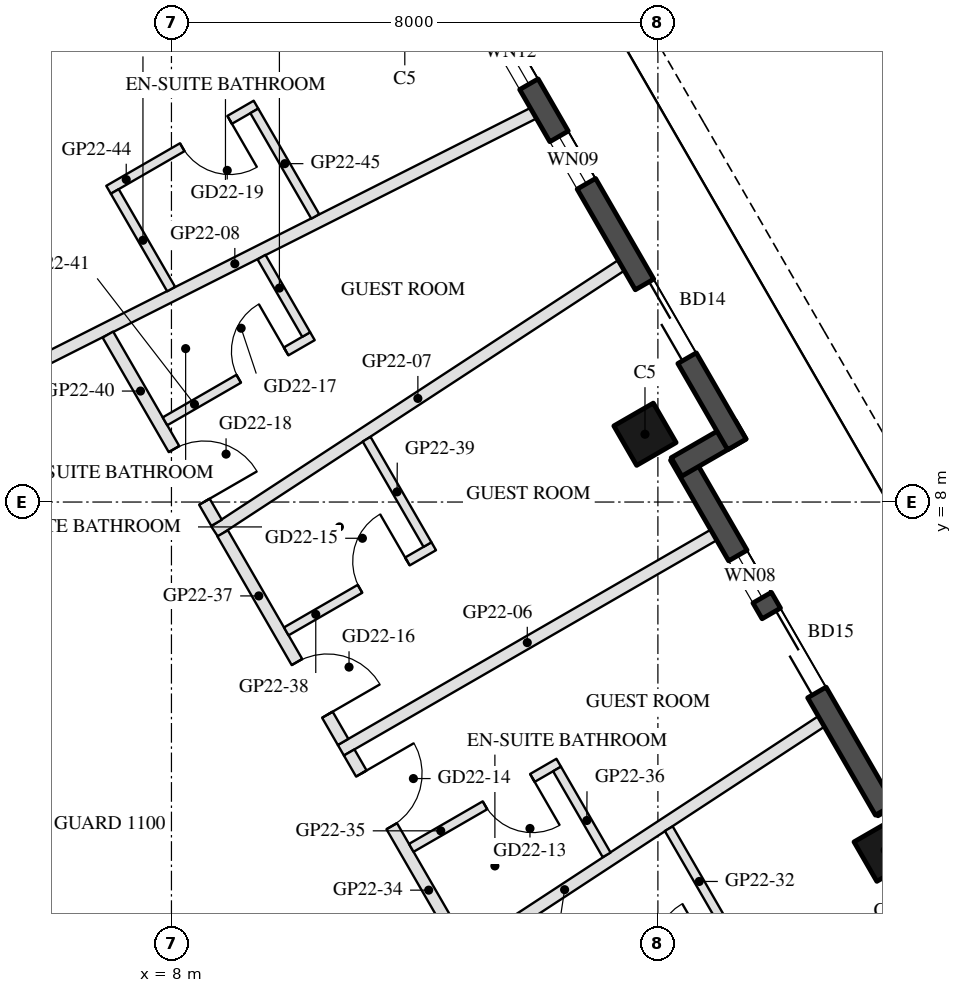
"""IFC4 building model, lengths in metres.
Left out: names, types, materials, properties, quantities, classifications, styles, units other than length and angle.
Written with IfcOpenShell. Run it as: python <this file> out.ifc"""

import sys

from ifc_helpers import new_model, si_unit, direction, frame, frame_2d, origin, origin_2d, place, context, subcontext, project, spatial, rectangle, hollow_rectangle, extrude, element, fill, save


model = new_model("IFC4")
c1 = context("Model", 3, precision=1e-05, world=origin(), true_north=direction((0.0, 1.0)))
c2 = subcontext(c1, "Body", "Model", "MODEL_VIEW")
j1 = project(units=[si_unit("LENGTHUNIT", "METRE"), si_unit("PLANEANGLEUNIT", "RADIAN")], contexts=[c1])
p1 = place(None, origin())
s1 = spatial("IfcSite", under=j1, at=p1, CompositionType="ELEMENT")
p2 = place(p1, origin())
s2 = spatial("IfcBuilding", under=s1, at=p2, CompositionType="ELEMENT")
p3 = place(p2, frame((0.0, 0.0, 224.3)))
s3 = spatial("IfcBuildingStorey", under=s2, at=p3, CompositionType="ELEMENT", Elevation=224.3)
for number, where, z_axis, x_axis in (
    (1, (19.738, 2.273, 0.0), (0.0, 0.0, 1.0), (-0.5, 0.866, 0.0)),
    (2, (15.788, 9.115, 0.0), (0.0, 0.0, 1.0), (-0.5, 0.866, 0.0)),
):
    element("IfcColumn", number, at=place(p3, frame(where, z_axis=z_axis, x_axis=x_axis)), inside=s3, PredefinedType="COLUMN", context=c2, shape_type="SweptSolid", body=[
        extrude(hollow_rectangle(XDim=0.75, YDim=0.75, WallThickness=0.035, at=origin_2d()), origin(), (0.0, 0.0, 1.0), 3.7),
    ])
p4 = place(p3, frame((20.588, 3.601, 0.0), z_axis=(0.0, 0.0, 1.0), x_axis=(-0.866005645448, -0.500034220881, 0.0)))
e3 = element("IfcWall", 3, at=p4, inside=s3, PredefinedType="SOLIDWALL", context=c2, shape_type="SweptSolid", body=[
    extrude(rectangle(XDim=1.22, YDim=0.35, at=frame_2d((0.61, 0.0))), origin(), (0.0, 0.0, 1.0), 3.55),
])
p5 = place(p3, frame((19.729, 2.938, 0.0), z_axis=(0.0, 0.0, 1.0), x_axis=(-0.499976430342, 0.866039011305, 0.0)))
e4 = element("IfcWall", 4, at=p5, inside=s3, PredefinedType="SOLIDWALL", context=c2, shape_type="SweptSolid", body=[
    extrude(rectangle(XDim=6.74, YDim=0.35, at=frame_2d((3.37, 0.0))), origin(), (0.0, 0.0, 1.0), 3.55),
])
p6 = place(p5, frame((2.229, 0.0, 0.0)))
e5 = element("IfcOpeningElement", 5, at=p6, cuts=e4, PredefinedType="OPENING", context=c2, shape_type="SweptSolid", body=[
    extrude(rectangle(XDim=1.5, YDim=2.4, at=frame_2d((0.75, 1.2))), frame((0.0, 0.185, 0.0), z_axis=(0.0, -1.0, 0.0), x_axis=(1.0, 0.0, 0.0)), (0.0, 0.0, 1.0), 0.37),
])
p7 = place(p5, frame((4.029, 0.0, 0.3)))
e6 = element("IfcOpeningElement", 6, at=p7, cuts=e4, PredefinedType="OPENING", context=c2, shape_type="SweptSolid", body=[
    extrude(rectangle(XDim=0.8, YDim=2.65, at=frame_2d((0.4, 1.325))), frame((0.0, 0.185, 0.0), z_axis=(0.0, -1.0, 0.0), x_axis=(1.0, 0.0, 0.0)), (0.0, 0.0, 1.0), 0.37),
])
p8 = place(p3, frame((16.306, 8.577, 0.0), z_axis=(0.0, 0.0, 1.0), x_axis=(0.866092288191, 0.499884134912, 0.0)))
e7 = element("IfcWall", 7, at=p8, inside=s3, PredefinedType="SOLIDWALL", context=c2, shape_type="SweptSolid", body=[
    extrude(rectangle(XDim=1.22, YDim=0.35, at=frame_2d((0.61, 0.0))), origin(), (0.0, 0.0, 1.0), 3.55),
])
p9 = place(p3, frame((17.299, 8.948, 0.0), z_axis=(0.0, 0.0, 1.0), x_axis=(-0.500010041276, 0.866019606374, 0.0)))
e8 = element("IfcWall", 8, at=p9, inside=s3, PredefinedType="SOLIDWALL", context=c2, shape_type="SweptSolid", body=[
    extrude(rectangle(XDim=9.7, YDim=0.35, at=frame_2d((4.85, 0.0))), origin(), (0.0, 0.0, 1.0), 3.55),
])
p10 = place(p9, frame((1.637, 0.0, 0.0)))
e9 = element("IfcOpeningElement", 9, at=p10, cuts=e8, PredefinedType="OPENING", context=c2, shape_type="SweptSolid", body=[
    extrude(rectangle(XDim=1.4, YDim=2.4, at=frame_2d((0.7, 1.2))), frame((0.0, 0.185, 0.0), z_axis=(0.0, -1.0, 0.0), x_axis=(1.0, 0.0, 0.0)), (0.0, 0.0, 1.0), 0.37),
])
p11 = place(p9, frame((4.949, 0.0, 0.3)))
e10 = element("IfcOpeningElement", 10, at=p11, cuts=e8, PredefinedType="OPENING", context=c2, shape_type="SweptSolid", body=[
    extrude(rectangle(XDim=0.9, YDim=2.65, at=frame_2d((0.45, 1.325))), frame((0.0, 0.185, 0.0), z_axis=(0.0, -1.0, 0.0), x_axis=(1.0, 0.0, 0.0)), (0.0, 0.0, 1.0), 0.37),
])
p12 = place(p9, frame((6.84, 0.0, 0.3)))
e11 = element("IfcOpeningElement", 11, at=p12, cuts=e8, PredefinedType="OPENING", context=c2, shape_type="SweptSolid", body=[
    extrude(rectangle(XDim=1.2, YDim=2.65, at=frame_2d((0.6, 1.325))), frame((0.0, 0.185, 0.0), z_axis=(0.0, -1.0, 0.0), x_axis=(1.0, 0.0, 0.0)), (0.0, 0.0, 1.0), 0.37),
])
p13 = place(p3, frame((18.688, 4.391, 0.0), z_axis=(0.0, 0.0, 1.0), x_axis=(-0.836395760685, -0.548126017909, 0.0)))
e12 = element("IfcWall", 12, at=p13, inside=s3, PredefinedType="PARTITIONING", context=c2, shape_type="SweptSolid", body=[
    extrude(rectangle(XDim=10.096, YDim=0.2, at=frame_2d((5.048, 0.0))), origin(), (0.0, 0.0, 1.0), 3.06),
])
p14 = place(p3, frame((16.917, 7.458, 0.0), z_axis=(0.0, 0.0, 1.0), x_axis=(-0.866019052629, -0.500011000363, 0.0)))
e13 = element("IfcWall", 13, at=p14, inside=s3, PredefinedType="PARTITIONING", context=c2, shape_type="SweptSolid", body=[
    extrude(rectangle(XDim=7.08, YDim=0.2, at=frame_2d((3.54, 0.0))), origin(), (0.0, 0.0, 1.0), 3.06),
])
p15 = place(p3, frame((15.397, 11.892, 0.0), z_axis=(0.0, 0.0, 1.0), x_axis=(-0.836905569615, -0.547347300667, 0.0)))
e14 = element("IfcWall", 14, at=p15, inside=s3, PredefinedType="PARTITIONING", context=c2, shape_type="SweptSolid", body=[
    extrude(rectangle(XDim=7.992, YDim=0.2, at=frame_2d((3.996, 0.0))), origin(), (0.0, 0.0, 1.0), 3.06),
])
p16 = place(p3, frame((13.952, 14.395, 0.0), z_axis=(0.0, 0.0, 1.0), x_axis=(-0.892890171934, -0.450274517226, 0.0)))
e15 = element("IfcWall", 15, at=p16, inside=s3, PredefinedType="PARTITIONING", context=c2, shape_type="SweptSolid", body=[
    extrude(rectangle(XDim=10.998, YDim=0.2, at=frame_2d((5.499, 0.0))), origin(), (0.0, 0.0, 1.0), 3.06),
])
p17 = place(p3, frame((17.181, 0.892, 0.0), z_axis=(0.0, 0.0, 1.0), x_axis=(-0.500056363668, 0.86599285976, 0.0)))
e16 = element("IfcWall", 16, at=p17, inside=s3, PredefinedType="PARTITIONING", context=c2, shape_type="SweptSolid", body=[
    extrude(rectangle(XDim=2.004, YDim=0.15, at=frame_2d((1.002, 0.0))), origin(), (0.0, 0.0, 1.0), 2.95),
])
p18 = place(p3, frame((10.923, 3.881, 0.0), z_axis=(0.0, 0.0, 1.0), x_axis=(0.499997756806, -0.866026698889, 0.0)))
e17 = element("IfcWall", 17, at=p18, inside=s3, PredefinedType="PARTITIONING", context=c2, shape_type="SweptSolid", body=[
    extrude(rectangle(XDim=3.736, YDim=0.2, at=frame_2d((1.868, 0.0))), origin(), (0.0, 0.0, 1.0), 2.95),
])
p19 = place(p18, frame((0.4, 0.0, 0.0)))
e18 = element("IfcOpeningElement", 18, at=p19, cuts=e17, PredefinedType="OPENING", context=c2, shape_type="SweptSolid", body=[
    extrude(rectangle(XDim=1.0, YDim=2.1, at=frame_2d((0.5, 1.05))), frame((0.0, 0.11, 0.0), z_axis=(0.0, -1.0, 0.0), x_axis=(1.0, 0.0, 0.0)), (0.0, 0.0, 1.0), 0.22),
])
p20 = place(p3, frame((14.369, 3.712, 0.0), z_axis=(0.0, 0.0, 1.0), x_axis=(-0.866034573852, -0.49998411664, 0.0)))
e19 = element("IfcWall", 19, at=p20, inside=s3, PredefinedType="PARTITIONING", context=c2, shape_type="SweptSolid", body=[
    extrude(rectangle(XDim=2.8, YDim=0.15, at=frame_2d((1.4, 0.0))), origin(), (0.0, 0.0, 1.0), 2.95),
])
p21 = place(p20, frame((0.5, 0.0, 0.0)))
e20 = element("IfcOpeningElement", 20, at=p21, cuts=e19, PredefinedType="OPENING", context=c2, shape_type="SweptSolid", body=[
    extrude(rectangle(XDim=0.9, YDim=2.1, at=frame_2d((0.45, 1.05))), frame((0.0, 0.085, 0.0), z_axis=(0.0, -1.0, 0.0), x_axis=(1.0, 0.0, 0.0)), (0.0, 0.0, 1.0), 0.17),
])
p22 = place(p3, frame((15.157, 2.197, 0.0), z_axis=(0.0, 0.0, 1.0), x_axis=(-0.500033287521, 0.866006184372, 0.0)))
e21 = element("IfcWall", 21, at=p22, inside=s3, PredefinedType="PARTITIONING", context=c2, shape_type="SweptSolid", body=[
    extrude(rectangle(XDim=1.632, YDim=0.15, at=frame_2d((0.816, 0.0))), origin(), (0.0, 0.0, 1.0), 2.95),
])
p23 = place(p3, frame((8.842, 7.485, 0.0), z_axis=(0.0, 0.0, 1.0), x_axis=(0.500030109098, -0.866008019591, 0.0)))
e22 = element("IfcWall", 22, at=p23, inside=s3, PredefinedType="PARTITIONING", context=c2, shape_type="SweptSolid", body=[
    extrude(rectangle(XDim=3.961, YDim=0.2, at=frame_2d((1.98, 0.0))), origin(), (0.0, 0.0, 1.0), 2.95),
])
p24 = place(p23, frame((2.444, 0.0, 0.0)))
e23 = element("IfcOpeningElement", 23, at=p24, cuts=e22, PredefinedType="OPENING", context=c2, shape_type="SweptSolid", body=[
    extrude(rectangle(XDim=1.0, YDim=2.1, at=frame_2d((0.5, 1.05))), frame((0.0, 0.11, 0.0), z_axis=(0.0, -1.0, 0.0), x_axis=(1.0, 0.0, 0.0)), (0.0, 0.0, 1.0), 0.22),
])
p25 = place(p3, frame((9.888, 5.873, 0.0), z_axis=(0.0, 0.0, 1.0), x_axis=(0.866034573852, 0.49998411664, 0.0)))
e24 = element("IfcWall", 24, at=p25, inside=s3, PredefinedType="PARTITIONING", context=c2, shape_type="SweptSolid", body=[
    extrude(rectangle(XDim=2.8, YDim=0.15, at=frame_2d((1.4, 0.0))), origin(), (0.0, 0.0, 1.0), 2.95),
])
p26 = place(p25, frame((1.4, 0.0, 0.0)))
e25 = element("IfcOpeningElement", 25, at=p26, cuts=e24, PredefinedType="OPENING", context=c2, shape_type="SweptSolid", body=[
    extrude(rectangle(XDim=0.9, YDim=2.1, at=frame_2d((0.45, 1.05))), frame((0.0, 0.085, 0.0), z_axis=(0.0, -1.0, 0.0), x_axis=(1.0, 0.0, 0.0)), (0.0, 0.0, 1.0), 0.17),
])
p27 = place(p3, frame((12.211, 7.3, 0.0), z_axis=(0.0, 0.0, 1.0), x_axis=(-0.499982900776, 0.866035275801, 0.0)))
e26 = element("IfcWall", 26, at=p27, inside=s3, PredefinedType="PARTITIONING", context=c2, shape_type="SweptSolid", body=[
    extrude(rectangle(XDim=2.001, YDim=0.15, at=frame_2d((1.001, 0.0))), origin(), (0.0, 0.0, 1.0), 3.55),
])
p28 = place(p3, frame((6.955, 10.754, 0.0), z_axis=(0.0, 0.0, 1.0), x_axis=(0.500018099276, -0.86601495391, 0.0)))
e27 = element("IfcWall", 27, at=p28, inside=s3, PredefinedType="PARTITIONING", context=c2, shape_type="SweptSolid", body=[
    extrude(rectangle(XDim=3.574, YDim=0.2, at=frame_2d((1.787, 0.0))), origin(), (0.0, 0.0, 1.0), 2.95),
])
p29 = place(p28, frame((2.174, 0.0, 0.0)))
e28 = element("IfcOpeningElement", 28, at=p29, cuts=e27, PredefinedType="OPENING", context=c2, shape_type="SweptSolid", body=[
    extrude(rectangle(XDim=1.0, YDim=2.1, at=frame_2d((0.5, 1.05))), frame((0.0, 0.11, 0.0), z_axis=(0.0, -1.0, 0.0), x_axis=(1.0, 0.0, 0.0)), (0.0, 0.0, 1.0), 0.22),
])
p30 = place(p3, frame((7.894, 9.327, 0.0), z_axis=(0.0, 0.0, 1.0), x_axis=(0.865996816683, 0.500049511043, 0.0)))
e29 = element("IfcWall", 29, at=p30, inside=s3, PredefinedType="PARTITIONING", context=c2, shape_type="SweptSolid", body=[
    extrude(rectangle(XDim=2.8, YDim=0.15, at=frame_2d((1.4, 0.0))), origin(), (0.0, 0.0, 1.0), 2.95),
])
p31 = place(p30, frame((1.4, 0.0, 0.0)))
e30 = element("IfcOpeningElement", 30, at=p31, cuts=e29, PredefinedType="OPENING", context=c2, shape_type="SweptSolid", body=[
    extrude(rectangle(XDim=0.9, YDim=2.1, at=frame_2d((0.45, 1.05))), frame((0.0, 0.085, 0.0), z_axis=(0.0, -1.0, 0.0), x_axis=(1.0, 0.0, 0.0)), (0.0, 0.0, 1.0), 0.17),
])
p32 = place(p3, frame((10.216, 10.755, 0.0), z_axis=(0.0, 0.0, 1.0), x_axis=(-0.50001473959, 0.866016893711, 0.0)))
e31 = element("IfcWall", 31, at=p32, inside=s3, PredefinedType="PARTITIONING", context=c2, shape_type="SweptSolid", body=[
    extrude(rectangle(XDim=1.47, YDim=0.15, at=frame_2d((0.735, 0.0))), origin(), (0.0, 0.0, 1.0), 3.55),
])
p33 = place(p3, frame((9.39, 14.536, 0.0), z_axis=(0.0, 0.0, 1.0), x_axis=(-0.866034573852, -0.49998411664, 0.0)))
e32 = element("IfcWall", 32, at=p33, inside=s3, PredefinedType="PARTITIONING", context=c2, shape_type="SweptSolid", body=[
    extrude(rectangle(XDim=2.8, YDim=0.15, at=frame_2d((1.4, 0.0))), origin(), (0.0, 0.0, 1.0), 2.95),
])
p34 = place(p33, frame((0.5, 0.0, 0.0)))
e33 = element("IfcOpeningElement", 33, at=p34, cuts=e32, PredefinedType="OPENING", context=c2, shape_type="SweptSolid", body=[
    extrude(rectangle(XDim=0.9, YDim=2.1, at=frame_2d((0.45, 1.05))), frame((0.0, 0.085, 0.0), z_axis=(0.0, -1.0, 0.0), x_axis=(1.0, 0.0, 0.0)), (0.0, 0.0, 1.0), 0.17),
])
p35 = place(p3, frame((10.365, 12.698, 0.0), z_axis=(0.0, 0.0, 1.0), x_axis=(-0.500056363668, 0.86599285976, 0.0)))
e34 = element("IfcWall", 34, at=p35, inside=s3, PredefinedType="PARTITIONING", context=c2, shape_type="SweptSolid", body=[
    extrude(rectangle(XDim=2.004, YDim=0.15, at=frame_2d((1.002, 0.0))), origin(), (0.0, 0.0, 1.0), 2.95),
])
p36 = place(p3, frame((7.995, 11.502, 0.0), z_axis=(0.0, 0.0, 1.0), x_axis=(-0.4999770169, 0.866038672677, 0.0)))
e35 = element("IfcWall", 35, at=p36, inside=s3, PredefinedType="PARTITIONING", context=c2, shape_type="SweptSolid", body=[
    extrude(rectangle(XDim=1.854, YDim=0.15, at=frame_2d((0.927, 0.0))), origin(), (0.0, 0.0, 1.0), 2.95),
])
p37 = place(p6, frame((1.5, 0.0, 0.0), z_axis=(0.0, 0.0, 1.0), x_axis=(-1.0, 0.0, 0.0)))
e36 = element("IfcDoor", 36, at=p37, inside=s3, OperationType="SLIDING_TO_LEFT", PredefinedType="DOOR", context=c2, shape_type="SweptSolid", body=[
    extrude(rectangle(XDim=1.5, YDim=2.4, at=frame_2d((0.75, 1.2))), frame((0.0, 0.025, 0.0), z_axis=(0.0, -1.0, 0.0), x_axis=(1.0, 0.0, 0.0)), (0.0, 0.0, 1.0), 0.05),
])
fill(e5, e36)
p38 = place(p7, origin())
e37 = element("IfcWindow", 37, at=p38, inside=s3, PartitioningType="SINGLE_PANEL", PredefinedType="WINDOW", context=c2, shape_type="SweptSolid", body=[
    extrude(rectangle(XDim=0.8, YDim=2.65, at=frame_2d((0.4, 1.325))), frame((0.0, 0.03, 0.0), z_axis=(0.0, -1.0, 0.0), x_axis=(1.0, 0.0, 0.0)), (0.0, 0.0, 1.0), 0.06),
])
fill(e6, e37)
p39 = place(p10, frame((1.4, 0.0, 0.0), z_axis=(0.0, 0.0, 1.0), x_axis=(-1.0, 0.0, 0.0)))
e38 = element("IfcDoor", 38, at=p39, inside=s3, OperationType="SLIDING_TO_LEFT", PredefinedType="DOOR", context=c2, shape_type="SweptSolid", body=[
    extrude(rectangle(XDim=1.4, YDim=2.4, at=frame_2d((0.7, 1.2))), frame((0.0, 0.025, 0.0), z_axis=(0.0, -1.0, 0.0), x_axis=(1.0, 0.0, 0.0)), (0.0, 0.0, 1.0), 0.05),
])
fill(e9, e38)
p40 = place(p11, origin())
e39 = element("IfcWindow", 39, at=p40, inside=s3, PartitioningType="SINGLE_PANEL", PredefinedType="WINDOW", context=c2, shape_type="SweptSolid", body=[
    extrude(rectangle(XDim=0.9, YDim=2.65, at=frame_2d((0.45, 1.325))), frame((0.0, 0.03, 0.0), z_axis=(0.0, -1.0, 0.0), x_axis=(1.0, 0.0, 0.0)), (0.0, 0.0, 1.0), 0.06),
])
fill(e10, e39)
p41 = place(p12, origin())
e40 = element("IfcWindow", 40, at=p41, inside=s3, PartitioningType="SINGLE_PANEL", PredefinedType="WINDOW", context=c2, shape_type="SweptSolid", body=[
    extrude(rectangle(XDim=1.2, YDim=2.65, at=frame_2d((0.6, 1.325))), frame((0.0, 0.03, 0.0), z_axis=(0.0, -1.0, 0.0), x_axis=(1.0, 0.0, 0.0)), (0.0, 0.0, 1.0), 0.06),
])
fill(e11, e40)
p42 = place(p21, origin())
e41 = element("IfcDoor", 41, at=p42, inside=s3, OperationType="SINGLE_SWING_LEFT", PredefinedType="DOOR", context=c2, shape_type="SweptSolid", body=[
    extrude(rectangle(XDim=0.9, YDim=2.1, at=frame_2d((0.45, 1.05))), frame((0.0, 0.025, 0.0), z_axis=(0.0, -1.0, 0.0), x_axis=(1.0, 0.0, 0.0)), (0.0, 0.0, 1.0), 0.05),
])
fill(e20, e41)
p43 = place(p19, origin())
e42 = element("IfcDoor", 42, at=p43, inside=s3, OperationType="SINGLE_SWING_LEFT", PredefinedType="DOOR", context=c2, shape_type="SweptSolid", body=[
    extrude(rectangle(XDim=1.0, YDim=2.1, at=frame_2d((0.5, 1.05))), frame((0.0, 0.025, 0.0), z_axis=(0.0, -1.0, 0.0), x_axis=(1.0, 0.0, 0.0)), (0.0, 0.0, 1.0), 0.05),
])
fill(e18, e42)
p44 = place(p26, origin())
e43 = element("IfcDoor", 43, at=p44, inside=s3, OperationType="SINGLE_SWING_RIGHT", PredefinedType="DOOR", context=c2, shape_type="SweptSolid", body=[
    extrude(rectangle(XDim=0.9, YDim=2.1, at=frame_2d((0.45, 1.05))), frame((0.0, 0.025, 0.0), z_axis=(0.0, -1.0, 0.0), x_axis=(1.0, 0.0, 0.0)), (0.0, 0.0, 1.0), 0.05),
])
fill(e25, e43)
p45 = place(p24, origin())
e44 = element("IfcDoor", 44, at=p45, inside=s3, OperationType="SINGLE_SWING_RIGHT", PredefinedType="DOOR", context=c2, shape_type="SweptSolid", body=[
    extrude(rectangle(XDim=1.0, YDim=2.1, at=frame_2d((0.5, 1.05))), frame((0.0, 0.025, 0.0), z_axis=(0.0, -1.0, 0.0), x_axis=(1.0, 0.0, 0.0)), (0.0, 0.0, 1.0), 0.05),
])
fill(e23, e44)
p46 = place(p31, origin())
e45 = element("IfcDoor", 45, at=p46, inside=s3, OperationType="SINGLE_SWING_RIGHT", PredefinedType="DOOR", context=c2, shape_type="SweptSolid", body=[
    extrude(rectangle(XDim=0.9, YDim=2.1, at=frame_2d((0.45, 1.05))), frame((0.0, 0.025, 0.0), z_axis=(0.0, -1.0, 0.0), x_axis=(1.0, 0.0, 0.0)), (0.0, 0.0, 1.0), 0.05),
])
fill(e30, e45)
p47 = place(p29, origin())
e46 = element("IfcDoor", 46, at=p47, inside=s3, OperationType="SINGLE_SWING_RIGHT", PredefinedType="DOOR", context=c2, shape_type="SweptSolid", body=[
    extrude(rectangle(XDim=1.0, YDim=2.1, at=frame_2d((0.5, 1.05))), frame((0.0, 0.025, 0.0), z_axis=(0.0, -1.0, 0.0), x_axis=(1.0, 0.0, 0.0)), (0.0, 0.0, 1.0), 0.05),
])
fill(e28, e46)
p48 = place(p34, origin())
e47 = element("IfcDoor", 47, at=p48, inside=s3, OperationType="SINGLE_SWING_LEFT", PredefinedType="DOOR", context=c2, shape_type="SweptSolid", body=[
    extrude(rectangle(XDim=0.9, YDim=2.1, at=frame_2d((0.45, 1.05))), frame((0.0, 0.025, 0.0), z_axis=(0.0, -1.0, 0.0), x_axis=(1.0, 0.0, 0.0)), (0.0, 0.0, 1.0), 0.05),
])
fill(e33, e47)
save(model, sys.argv[1])
